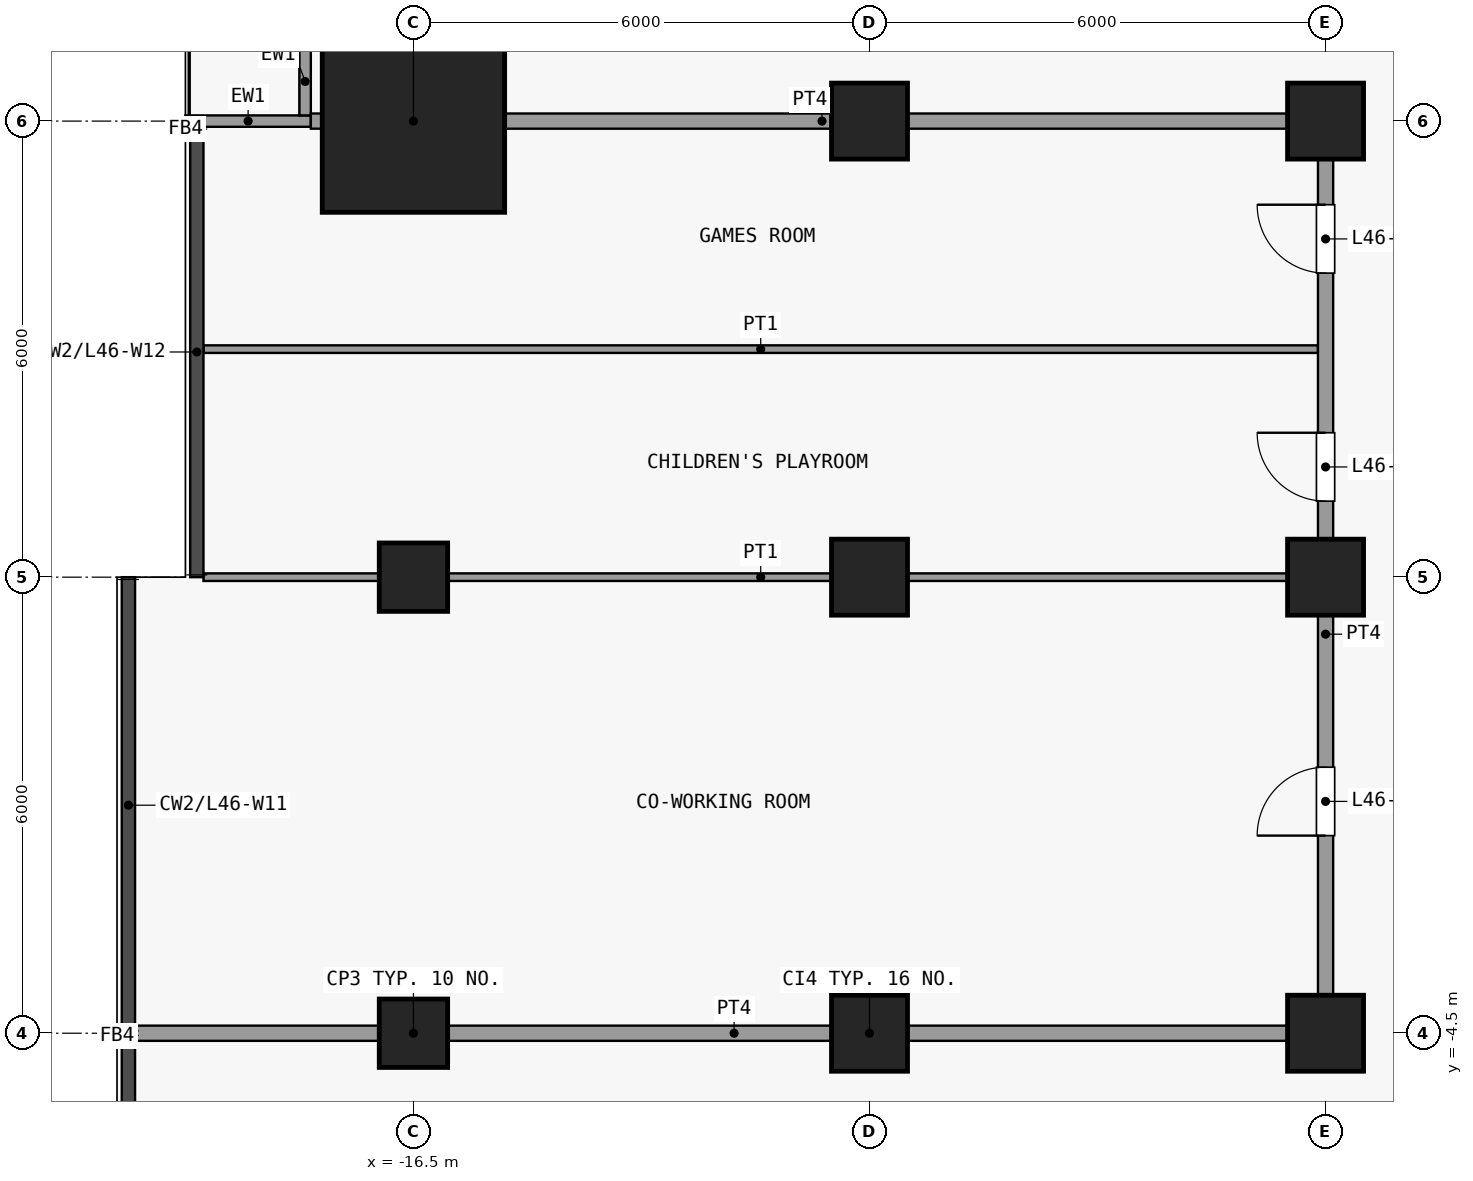
"""IFC4 building model, lengths in metres.
Left out: names, types, materials, properties, quantities, classifications, styles, units other than length and angle.
Written with IfcOpenShell. Run it as: python <this file> out.ifc"""

import sys

from ifc_helpers import new_model, si_unit, direction, frame, frame_2d, origin, origin_2d, place, context, subcontext, project, spatial, rectangle, extrude, element, fill, save


model = new_model("IFC4")
c1 = context("Model", 3, precision=1e-05, world=origin(), true_north=direction((0.0, 1.0)))
c2 = subcontext(c1, "Body", "Model", "MODEL_VIEW")
j1 = project(units=[si_unit("LENGTHUNIT", "METRE"), si_unit("PLANEANGLEUNIT", "RADIAN")], contexts=[c1])
p1 = place(None, origin())
s1 = spatial("IfcSite", under=j1, at=p1, CompositionType="ELEMENT")
p2 = place(p1, origin())
s2 = spatial("IfcBuilding", under=s1, at=p2, CompositionType="ELEMENT")
p3 = place(p2, frame((0.0, 0.0, 185.3)))
s3 = spatial("IfcBuildingStorey", under=s2, at=p3, CompositionType="ELEMENT", Elevation=185.3)
for number, where, z_axis, x_axis in (
    (1, (-16.5, -4.5, 0.0), (0.0, 0.0, 1.0), (1.0, 0.0, 0.0)),
    (2, (-16.5, 1.5, 0.0), (0.0, 0.0, 1.0), (1.0, 0.0, 0.0)),
):
    element("IfcColumn", number, at=place(p3, frame(where, z_axis=z_axis, x_axis=x_axis)), inside=s3, PredefinedType="COLUMN", context=c2, shape_type="SweptSolid", body=[
        extrude(rectangle(XDim=0.9, YDim=0.9, at=origin_2d()), origin(), (0.0, 0.0, 1.0), 3.6),
    ])
p4 = place(p3, frame((-16.5, 7.5, 0.0), z_axis=(0.0, 0.0, 1.0), x_axis=(1.0, 0.0, 0.0)))
e3 = element("IfcColumn", 3, at=p4, inside=s3, PredefinedType="COLUMN", context=c2, shape_type="SweptSolid", body=[
    extrude(rectangle(XDim=2.4, YDim=2.4, at=origin_2d()), origin(), (0.0, 0.0, 1.0), 3.6),
])
for number, where, z_axis, x_axis in (
    (4, (-10.5, -4.5, 0.0), (0.0, 0.0, 1.0), (1.0, 0.0, 0.0)),
    (5, (-10.5, 1.5, 0.0), (0.0, 0.0, 1.0), (1.0, 0.0, 0.0)),
    (6, (-10.5, 7.5, 0.0), (0.0, 0.0, 1.0), (1.0, 0.0, 0.0)),
    (7, (-4.5, -4.5, 0.0), (0.0, 0.0, 1.0), (1.0, 0.0, 0.0)),
    (8, (-4.5, 1.5, 0.0), (0.0, 0.0, 1.0), (1.0, 0.0, 0.0)),
    (9, (-4.5, 7.5, 0.0), (0.0, 0.0, 1.0), (1.0, 0.0, 0.0)),
):
    element("IfcColumn", number, at=place(p3, frame(where, z_axis=z_axis, x_axis=x_axis)), inside=s3, PredefinedType="COLUMN", context=c2, shape_type="SweptSolid", body=[
        extrude(rectangle(XDim=1.0, YDim=1.0, at=origin_2d()), origin(), (0.0, 0.0, 1.0), 3.6),
    ])
p5 = place(p3, frame((-17.85, 7.5, 0.0), z_axis=(0.0, 0.0, 1.0), x_axis=(-1.0, 0.0, 0.0)))
e10 = element("IfcWall", 10, at=p5, inside=s3, PredefinedType="SOLIDWALL", context=c2, shape_type="SweptSolid", body=[
    extrude(rectangle(XDim=1.65, YDim=0.15, at=frame_2d((0.825, 0.0))), origin(), (0.0, 0.0, 1.0), 3.3),
])
p6 = place(p3, frame((-17.925, 7.575, 0.0), z_axis=(0.0, 0.0, 1.0), x_axis=(0.0, 1.0, 0.0)))
e11 = element("IfcWall", 11, at=p6, inside=s3, PredefinedType="SOLIDWALL", context=c2, shape_type="SweptSolid", body=[
    extrude(rectangle(XDim=5.85, YDim=0.15, at=frame_2d((2.925, 0.0))), origin(), (0.0, 0.0, 1.0), 3.3),
])
p7 = place(p6, frame((3.825, 0.0, 0.0)))
e12 = element("IfcOpeningElement", 12, at=p7, cuts=e11, PredefinedType="OPENING", context=c2, shape_type="SweptSolid", body=[
    extrude(rectangle(XDim=1.2, YDim=2.4, at=frame_2d((0.6, 1.2))), frame((0.0, 0.085, 0.0), z_axis=(0.0, -1.0, 0.0), x_axis=(1.0, 0.0, 0.0)), (0.0, 0.0, 1.0), 0.17),
])
p8 = place(p6, frame((1.012, 0.0, 0.9)))
e13 = element("IfcOpeningElement", 13, at=p8, cuts=e11, PredefinedType="OPENING", context=c2, shape_type="SweptSolid", body=[
    extrude(rectangle(XDim=1.8, YDim=2.1, at=frame_2d((0.9, 1.05))), frame((0.0, 0.085, 0.0), z_axis=(0.0, -1.0, 0.0), x_axis=(1.0, 0.0, 0.0)), (0.0, 0.0, 1.0), 0.17),
])
p9 = place(p3, frame((-20.163, -4.5, 0.0), z_axis=(0.0, 0.0, 1.0), x_axis=(1.0, 0.0, 0.0)))
e14 = element("IfcWall", 14, at=p9, inside=s3, PredefinedType="PARTITIONING", context=c2, shape_type="SweptSolid", body=[
    extrude(rectangle(XDim=15.763, YDim=0.2, at=frame_2d((7.881, 0.0))), origin(), (0.0, 0.0, 1.0), 3.3),
])
for number, where, z_axis, x_axis in (
    (15, (-19.262, 1.5, 0.0), (0.0, 0.0, 1.0), (1.0, 0.0, 0.0)),
    (16, (-19.262, 4.5, 0.0), (0.0, 0.0, 1.0), (1.0, 0.0, 0.0)),
):
    element("IfcWall", number, at=place(p3, frame(where, z_axis=z_axis, x_axis=x_axis)), inside=s3, PredefinedType="PARTITIONING", context=c2, shape_type="SweptSolid", body=[
        extrude(rectangle(XDim=14.662, YDim=0.1, at=frame_2d((7.331, 0.0))), origin(), (0.0, 0.0, 1.0), 3.3),
    ])
p10 = place(p3, frame((-17.85, 7.5, 0.0), z_axis=(0.0, 0.0, 1.0), x_axis=(1.0, 0.0, 0.0)))
e17 = element("IfcWall", 17, at=p10, inside=s3, PredefinedType="PARTITIONING", context=c2, shape_type="SweptSolid", body=[
    extrude(rectangle(XDim=13.45, YDim=0.2, at=frame_2d((6.725, 0.0))), origin(), (0.0, 0.0, 1.0), 3.3),
])
p11 = place(p3, frame((-4.5, -4.4, 0.0), z_axis=(0.0, 0.0, 1.0), x_axis=(0.0, 1.0, 0.0)))
e18 = element("IfcWall", 18, at=p11, inside=s3, PredefinedType="PARTITIONING", context=c2, shape_type="SweptSolid", body=[
    extrude(rectangle(XDim=11.8, YDim=0.2, at=frame_2d((5.9, 0.0))), origin(), (0.0, 0.0, 1.0), 3.3),
])
p12 = place(p11, frame((2.5, 0.0, 0.0)))
e19 = element("IfcOpeningElement", 19, at=p12, cuts=e18, PredefinedType="OPENING", context=c2, shape_type="SweptSolid", body=[
    extrude(rectangle(XDim=0.9, YDim=2.1, at=frame_2d((0.45, 1.05))), frame((0.0, 0.11, 0.0), z_axis=(0.0, -1.0, 0.0), x_axis=(1.0, 0.0, 0.0)), (0.0, 0.0, 1.0), 0.22),
])
p13 = place(p11, frame((6.9, 0.0, 0.0)))
e20 = element("IfcOpeningElement", 20, at=p13, cuts=e18, PredefinedType="OPENING", context=c2, shape_type="SweptSolid", body=[
    extrude(rectangle(XDim=0.9, YDim=2.1, at=frame_2d((0.45, 1.05))), frame((0.0, 0.11, 0.0), z_axis=(0.0, -1.0, 0.0), x_axis=(1.0, 0.0, 0.0)), (0.0, 0.0, 1.0), 0.22),
])
p14 = place(p11, frame((9.9, 0.0, 0.0)))
e21 = element("IfcOpeningElement", 21, at=p14, cuts=e18, PredefinedType="OPENING", context=c2, shape_type="SweptSolid", body=[
    extrude(rectangle(XDim=0.9, YDim=2.1, at=frame_2d((0.45, 1.05))), frame((0.0, 0.11, 0.0), z_axis=(0.0, -1.0, 0.0), x_axis=(1.0, 0.0, 0.0)), (0.0, 0.0, 1.0), 0.22),
])
p15 = place(p12, origin())
e22 = element("IfcDoor", 22, at=p15, inside=s3, OperationType="SINGLE_SWING_RIGHT", PredefinedType="DOOR", context=c2, shape_type="SweptSolid", body=[
    extrude(rectangle(XDim=0.9, YDim=2.1, at=frame_2d((0.45, 1.05))), frame((0.0, 0.025, 0.0), z_axis=(0.0, -1.0, 0.0), x_axis=(1.0, 0.0, 0.0)), (0.0, 0.0, 1.0), 0.05),
])
fill(e19, e22)
p16 = place(p13, origin())
e23 = element("IfcDoor", 23, at=p16, inside=s3, OperationType="SINGLE_SWING_LEFT", PredefinedType="DOOR", context=c2, shape_type="SweptSolid", body=[
    extrude(rectangle(XDim=0.9, YDim=2.1, at=frame_2d((0.45, 1.05))), frame((0.0, 0.025, 0.0), z_axis=(0.0, -1.0, 0.0), x_axis=(1.0, 0.0, 0.0)), (0.0, 0.0, 1.0), 0.05),
])
fill(e20, e23)
p17 = place(p14, origin())
e24 = element("IfcDoor", 24, at=p17, inside=s3, OperationType="SINGLE_SWING_LEFT", PredefinedType="DOOR", context=c2, shape_type="SweptSolid", body=[
    extrude(rectangle(XDim=0.9, YDim=2.1, at=frame_2d((0.45, 1.05))), frame((0.0, 0.025, 0.0), z_axis=(0.0, -1.0, 0.0), x_axis=(1.0, 0.0, 0.0)), (0.0, 0.0, 1.0), 0.05),
])
fill(e21, e24)
save(model, sys.argv[1])
